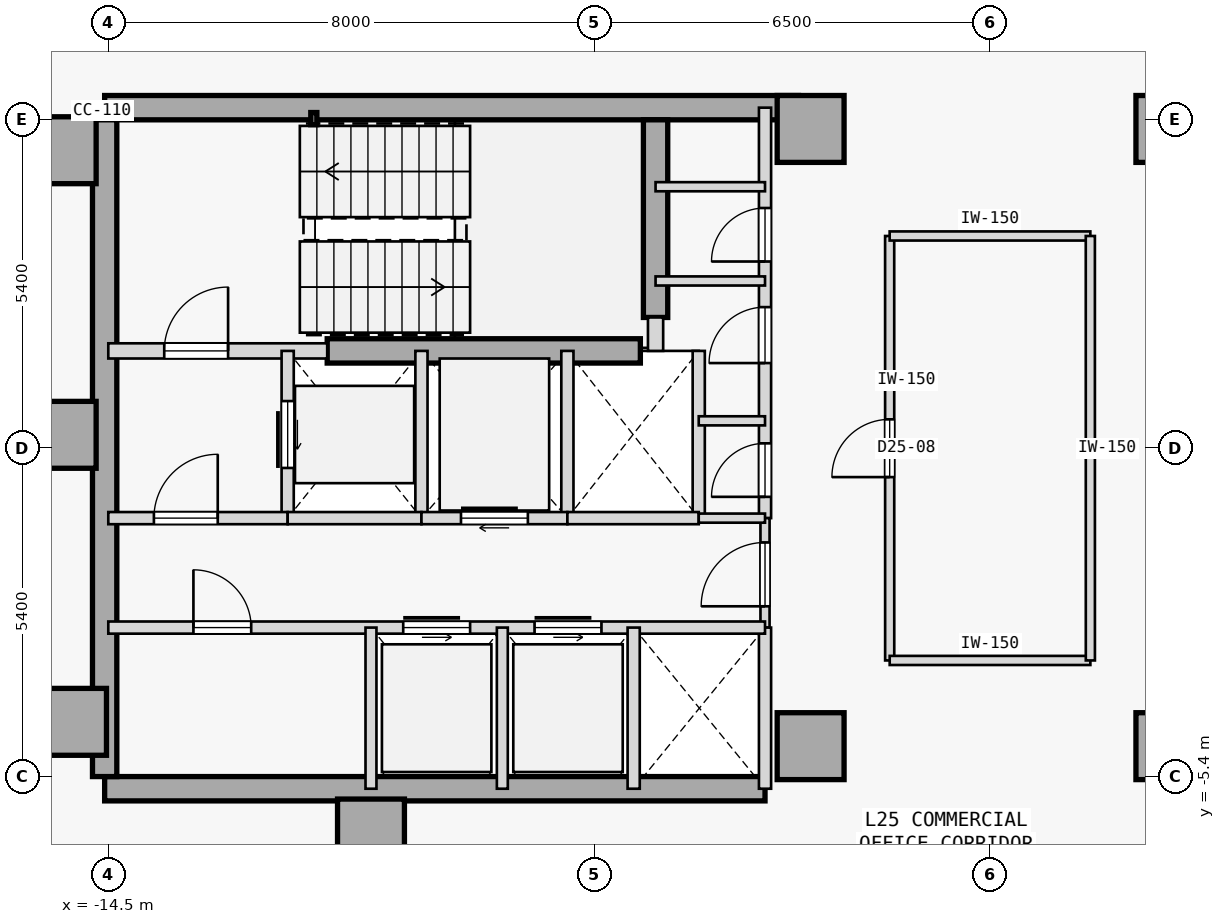
"""IFC4 building model, lengths in metres.
Left out: names, types, materials, properties, quantities, classifications, styles, units other than length and angle.
Written with IfcOpenShell. Run it as: python <this file> out.ifc"""

import sys

from ifc_helpers import new_model, si_unit, direction, frame, frame_2d, origin, origin_2d, place, context, subcontext, project, spatial, rectangle, hollow_rectangle, extrude, element, fill, save


model = new_model("IFC4")
c1 = context("Model", 3, precision=1e-05, world=origin(), true_north=direction((0.0, 1.0)))
c2 = subcontext(c1, "Body", "Model", "MODEL_VIEW")
j1 = project(units=[si_unit("LENGTHUNIT", "METRE"), si_unit("PLANEANGLEUNIT", "RADIAN")], contexts=[c1])
p1 = place(None, origin())
s1 = spatial("IfcSite", under=j1, at=p1, CompositionType="ELEMENT")
p2 = place(p1, origin())
s2 = spatial("IfcBuilding", under=s1, at=p2, CompositionType="ELEMENT")
p3 = place(p2, frame((0.0, 0.0, 102.2)))
s3 = spatial("IfcBuildingStorey", under=s2, at=p3, CompositionType="ELEMENT", Elevation=102.2)
for number, where, z_axis, x_axis in (
    (1, (-15.25, 4.9, 0.0), (0.0, 0.0, 1.0), (1.0, 0.0, 0.0)),
    (2, (-15.25, 0.22, 0.0), (0.0, 0.0, 1.0), (1.0, 0.0, 0.0)),
    (3, (-15.08, -4.5, 0.0), (0.0, 0.0, 1.0), (1.0, 0.0, 0.0)),
    (4, (-10.18, -6.32, 0.0), (0.0, 0.0, 1.0), (1.0, 0.0, 0.0)),
    (5, (-2.95, -4.9, 0.0), (0.0, 0.0, 1.0), (1.0, 0.0, 0.0)),
    (6, (-2.95, 5.25, 0.0), (0.0, 0.0, 1.0), (1.0, 0.0, 0.0)),
    (7, (2.95, -4.9, 0.0), (0.0, 0.0, 1.0), (1.0, 0.0, 0.0)),
    (8, (2.95, 5.25, 0.0), (0.0, 0.0, 1.0), (1.0, 0.0, 0.0)),
):
    element("IfcColumn", number, at=place(p3, frame(where, z_axis=z_axis, x_axis=x_axis)), inside=s3, PredefinedType="COLUMN", context=c2, shape_type="SweptSolid", body=[
        extrude(rectangle(XDim=1.1, YDim=1.1, at=origin_2d()), origin(), (0.0, 0.0, 1.0), 3.7),
    ])
p4 = place(p3, frame((-14.56, 5.6, 0.0), z_axis=(0.0, 0.0, 1.0), x_axis=(1.0, 0.0, 0.0)))
e9 = element("IfcWall", 9, at=p4, inside=s3, PredefinedType="SHEAR", context=c2, shape_type="SweptSolid", body=[
    extrude(rectangle(XDim=11.41, YDim=0.4, at=frame_2d((5.705, 0.0))), origin(), (0.0, 0.0, 1.0), 3.475),
])
p5 = place(p3, frame((-14.56, -5.6, 0.0), z_axis=(0.0, 0.0, 1.0), x_axis=(1.0, 0.0, 0.0)))
e10 = element("IfcWall", 10, at=p5, inside=s3, PredefinedType="SHEAR", context=c2, shape_type="SweptSolid", body=[
    extrude(rectangle(XDim=10.86, YDim=0.4, at=frame_2d((5.43, 0.0))), origin(), (0.0, 0.0, 1.0), 3.475),
])
p6 = place(p3, frame((-14.56, -5.4, 0.0), z_axis=(0.0, 0.0, 1.0), x_axis=(0.0, 1.0, 0.0)))
e11 = element("IfcWall", 11, at=p6, inside=s3, PredefinedType="SHEAR", context=c2, shape_type="SweptSolid", body=[
    extrude(rectangle(XDim=10.8, YDim=0.4, at=frame_2d((5.4, 0.0))), origin(), (0.0, 0.0, 1.0), 3.475),
])
p7 = place(p3, frame((-5.5, 2.15, 0.0), z_axis=(0.0, 0.0, 1.0), x_axis=(0.0, 1.0, 0.0)))
e12 = element("IfcWall", 12, at=p7, inside=s3, PredefinedType="SHEAR", context=c2, shape_type="SweptSolid", body=[
    extrude(rectangle(XDim=3.25, YDim=0.4, at=frame_2d((1.625, 0.0))), origin(), (0.0, 0.0, 1.0), 3.475),
])
p8 = place(p3, frame((-10.9, 1.6, 0.0), z_axis=(0.0, 0.0, 1.0), x_axis=(1.0, 0.0, 0.0)))
e13 = element("IfcWall", 13, at=p8, inside=s3, PredefinedType="SHEAR", context=c2, shape_type="SweptSolid", body=[
    extrude(rectangle(XDim=5.15, YDim=0.4, at=frame_2d((2.575, 0.0))), origin(), (0.0, 0.0, 1.0), 3.475),
])
p9 = place(p3, frame((-11.12, 5.42, 0.0), z_axis=(0.0, 0.0, 1.0), x_axis=(1.0, 0.0, 0.0)))
e14 = element("IfcColumn", 14, at=p9, inside=s3, PredefinedType="COLUMN", context=c2, shape_type="SweptSolid", body=[
    extrude(hollow_rectangle(XDim=0.1, YDim=0.2, WallThickness=0.008, at=origin_2d()), origin(), (0.0, 0.0, 1.0), 3.7),
])
p10 = place(p3, frame((-14.5, 1.6, 0.0), z_axis=(0.0, 0.0, 1.0), x_axis=(1.0, 0.0, 0.0)))
e15 = element("IfcWall", 15, at=p10, inside=s3, PredefinedType="STANDARD", context=c2, shape_type="SweptSolid", body=[
    extrude(rectangle(XDim=3.6, YDim=0.25, at=frame_2d((1.8, 0.0))), origin(), (0.0, 0.0, 1.0), 3.475),
])
p11 = place(p10, frame((0.92, 0.0, 0.0)))
e16 = element("IfcOpeningElement", 16, at=p11, cuts=e15, PredefinedType="OPENING", context=c2, shape_type="SweptSolid", body=[
    extrude(rectangle(XDim=1.05, YDim=2.15, at=frame_2d((0.525, 1.075))), frame((0.0, 0.135, 0.0), z_axis=(0.0, -1.0, 0.0), x_axis=(1.0, 0.0, 0.0)), (0.0, 0.0, 1.0), 0.27),
])
p12 = place(p3, frame((-5.5, 1.6, 0.0), z_axis=(0.0, 0.0, 1.0), x_axis=(0.0, 1.0, 0.0)))
e17 = element("IfcWall", 17, at=p12, inside=s3, PredefinedType="STANDARD", context=c2, shape_type="SweptSolid", body=[
    extrude(rectangle(XDim=0.55, YDim=0.25, at=frame_2d((0.275, 0.0))), origin(), (0.0, 0.0, 1.0), 3.475),
])
p13 = place(p3, frame((-3.7, -1.15, 0.0), z_axis=(0.0, 0.0, 1.0), x_axis=(0.0, 1.0, 0.0)))
e18 = element("IfcWall", 18, at=p13, inside=s3, PredefinedType="STANDARD", context=c2, shape_type="SweptSolid", body=[
    extrude(rectangle(XDim=6.75, YDim=0.2, at=frame_2d((3.375, 0.0))), origin(), (0.0, 0.0, 1.0), 3.475),
])
p14 = place(p13, frame((0.35, 0.0, 0.0)))
e19 = element("IfcOpeningElement", 19, at=p14, cuts=e18, PredefinedType="OPENING", context=c2, shape_type="SweptSolid", body=[
    extrude(rectangle(XDim=0.88, YDim=2.15, at=frame_2d((0.44, 1.075))), frame((0.0, 0.11, 0.0), z_axis=(0.0, -1.0, 0.0), x_axis=(1.0, 0.0, 0.0)), (0.0, 0.0, 1.0), 0.22),
])
p15 = place(p13, frame((2.55, 0.0, 0.0)))
e20 = element("IfcOpeningElement", 20, at=p15, cuts=e18, PredefinedType="OPENING", context=c2, shape_type="SweptSolid", body=[
    extrude(rectangle(XDim=0.92, YDim=2.15, at=frame_2d((0.46, 1.075))), frame((0.0, 0.11, 0.0), z_axis=(0.0, -1.0, 0.0), x_axis=(1.0, 0.0, 0.0)), (0.0, 0.0, 1.0), 0.22),
])
p16 = place(p13, frame((4.22, 0.0, 0.0)))
e21 = element("IfcOpeningElement", 21, at=p16, cuts=e18, PredefinedType="OPENING", context=c2, shape_type="SweptSolid", body=[
    extrude(rectangle(XDim=0.88, YDim=2.15, at=frame_2d((0.44, 1.075))), frame((0.0, 0.11, 0.0), z_axis=(0.0, -1.0, 0.0), x_axis=(1.0, 0.0, 0.0)), (0.0, 0.0, 1.0), 0.22),
])
p17 = place(p3, frame((-3.7, -2.95, 0.0), z_axis=(0.0, 0.0, 1.0), x_axis=(0.0, 1.0, 0.0)))
e22 = element("IfcWall", 22, at=p17, inside=s3, PredefinedType="PARTITIONING", context=c2, shape_type="SweptSolid", body=[
    extrude(rectangle(XDim=1.8, YDim=0.15, at=frame_2d((0.9, 0.0))), origin(), (0.0, 0.0, 1.0), 3.475),
])
p18 = place(p17, frame((0.35, 0.0, 0.0)))
e23 = element("IfcOpeningElement", 23, at=p18, cuts=e22, PredefinedType="OPENING", context=c2, shape_type="SweptSolid", body=[
    extrude(rectangle(XDim=1.05, YDim=2.18, at=frame_2d((0.525, 1.09))), frame((0.0, 0.085, 0.0), z_axis=(0.0, -1.0, 0.0), x_axis=(1.0, 0.0, 0.0)), (0.0, 0.0, 1.0), 0.17),
])
p19 = place(p3, frame((-3.7, -5.6, 0.0), z_axis=(0.0, 0.0, 1.0), x_axis=(0.0, 1.0, 0.0)))
e24 = element("IfcWall", 24, at=p19, inside=s3, PredefinedType="STANDARD", context=c2, shape_type="SweptSolid", body=[
    extrude(rectangle(XDim=2.65, YDim=0.2, at=frame_2d((1.325, 0.0))), origin(), (0.0, 0.0, 1.0), 3.475),
])
p20 = place(p3, frame((-11.55, -1.15, 0.0), z_axis=(0.0, 0.0, 1.0), x_axis=(0.0, 1.0, 0.0)))
e25 = element("IfcWall", 25, at=p20, inside=s3, PredefinedType="STANDARD", context=c2, shape_type="SweptSolid", body=[
    extrude(rectangle(XDim=2.75, YDim=0.2, at=frame_2d((1.375, 0.0))), origin(), (0.0, 0.0, 1.0), 3.475),
])
p21 = place(p20, frame((0.825, 0.0, 0.0)))
e26 = element("IfcOpeningElement", 26, at=p21, cuts=e25, PredefinedType="OPENING", context=c2, shape_type="SweptSolid", body=[
    extrude(rectangle(XDim=1.1, YDim=2.15, at=frame_2d((0.55, 1.075))), frame((0.0, 0.11, 0.0), z_axis=(0.0, -1.0, 0.0), x_axis=(1.0, 0.0, 0.0)), (0.0, 0.0, 1.0), 0.22),
])
p22 = place(p3, frame((-9.35, -1.15, 0.0), z_axis=(0.0, 0.0, 1.0), x_axis=(0.0, 1.0, 0.0)))
e27 = element("IfcWall", 27, at=p22, inside=s3, PredefinedType="STANDARD", context=c2, shape_type="SweptSolid", body=[
    extrude(rectangle(XDim=2.75, YDim=0.2, at=frame_2d((1.375, 0.0))), origin(), (0.0, 0.0, 1.0), 3.475),
])
p23 = place(p3, frame((-14.5, -1.15, 0.0), z_axis=(0.0, 0.0, 1.0), x_axis=(1.0, 0.0, 0.0)))
e28 = element("IfcWall", 28, at=p23, inside=s3, PredefinedType="STANDARD", context=c2, shape_type="SweptSolid", body=[
    extrude(rectangle(XDim=2.95, YDim=0.2, at=frame_2d((1.475, 0.0))), origin(), (0.0, 0.0, 1.0), 3.475),
])
p24 = place(p23, frame((0.75, 0.0, 0.0)))
e29 = element("IfcOpeningElement", 29, at=p24, cuts=e28, PredefinedType="OPENING", context=c2, shape_type="SweptSolid", body=[
    extrude(rectangle(XDim=1.05, YDim=2.18, at=frame_2d((0.525, 1.09))), frame((0.0, 0.11, 0.0), z_axis=(0.0, -1.0, 0.0), x_axis=(1.0, 0.0, 0.0)), (0.0, 0.0, 1.0), 0.22),
])
p25 = place(p3, frame((-11.55, -1.15, 0.0), z_axis=(0.0, 0.0, 1.0), x_axis=(1.0, 0.0, 0.0)))
e30 = element("IfcWall", 30, at=p25, inside=s3, PredefinedType="STANDARD", context=c2, shape_type="SweptSolid", body=[
    extrude(rectangle(XDim=2.2, YDim=0.2, at=frame_2d((1.1, 0.0))), origin(), (0.0, 0.0, 1.0), 3.475),
])
p26 = place(p3, frame((-6.95, -1.15, 0.0), z_axis=(0.0, 0.0, 1.0), x_axis=(0.0, 1.0, 0.0)))
e31 = element("IfcWall", 31, at=p26, inside=s3, PredefinedType="STANDARD", context=c2, shape_type="SweptSolid", body=[
    extrude(rectangle(XDim=2.75, YDim=0.2, at=frame_2d((1.375, 0.0))), origin(), (0.0, 0.0, 1.0), 3.475),
])
p27 = place(p3, frame((-9.35, -1.15, 0.0), z_axis=(0.0, 0.0, 1.0), x_axis=(1.0, 0.0, 0.0)))
e32 = element("IfcWall", 32, at=p27, inside=s3, PredefinedType="STANDARD", context=c2, shape_type="SweptSolid", body=[
    extrude(rectangle(XDim=2.4, YDim=0.2, at=frame_2d((1.2, 0.0))), origin(), (0.0, 0.0, 1.0), 3.475),
])
p28 = place(p27, frame((0.65, 0.0, 0.0)))
e33 = element("IfcOpeningElement", 33, at=p28, cuts=e32, PredefinedType="OPENING", context=c2, shape_type="SweptSolid", body=[
    extrude(rectangle(XDim=1.1, YDim=2.15, at=frame_2d((0.55, 1.075))), frame((0.0, 0.11, 0.0), z_axis=(0.0, -1.0, 0.0), x_axis=(1.0, 0.0, 0.0)), (0.0, 0.0, 1.0), 0.22),
])
p29 = place(p3, frame((-4.79, -1.15, 0.0), z_axis=(0.0, 0.0, 1.0), x_axis=(0.0, 1.0, 0.0)))
e34 = element("IfcWall", 34, at=p29, inside=s3, PredefinedType="STANDARD", context=c2, shape_type="SweptSolid", body=[
    extrude(rectangle(XDim=2.75, YDim=0.2, at=frame_2d((1.375, 0.0))), origin(), (0.0, 0.0, 1.0), 3.475),
])
p30 = place(p3, frame((-6.95, -1.15, 0.0), z_axis=(0.0, 0.0, 1.0), x_axis=(1.0, 0.0, 0.0)))
e35 = element("IfcWall", 35, at=p30, inside=s3, PredefinedType="STANDARD", context=c2, shape_type="SweptSolid", body=[
    extrude(rectangle(XDim=2.16, YDim=0.2, at=frame_2d((1.08, 0.0))), origin(), (0.0, 0.0, 1.0), 3.475),
])
p31 = place(p3, frame((-4.79, -1.15, 0.0), z_axis=(0.0, 0.0, 1.0), x_axis=(1.0, 0.0, 0.0)))
e36 = element("IfcWall", 36, at=p31, inside=s3, PredefinedType="PARTITIONING", context=c2, shape_type="SweptSolid", body=[
    extrude(rectangle(XDim=1.09, YDim=0.15, at=frame_2d((0.545, 0.0))), origin(), (0.0, 0.0, 1.0), 3.475),
])
p32 = place(p3, frame((-14.5, -2.95, 0.0), z_axis=(0.0, 0.0, 1.0), x_axis=(1.0, 0.0, 0.0)))
e37 = element("IfcWall", 37, at=p32, inside=s3, PredefinedType="STANDARD", context=c2, shape_type="SweptSolid", body=[
    extrude(rectangle(XDim=10.8, YDim=0.2, at=frame_2d((5.4, 0.0))), origin(), (0.0, 0.0, 1.0), 3.475),
])
p33 = place(p32, frame((4.85, 0.0, 0.0)))
e38 = element("IfcOpeningElement", 38, at=p33, cuts=e37, PredefinedType="OPENING", context=c2, shape_type="SweptSolid", body=[
    extrude(rectangle(XDim=1.1, YDim=2.15, at=frame_2d((0.55, 1.075))), frame((0.0, 0.11, 0.0), z_axis=(0.0, -1.0, 0.0), x_axis=(1.0, 0.0, 0.0)), (0.0, 0.0, 1.0), 0.22),
])
p34 = place(p32, frame((7.01, 0.0, 0.0)))
e39 = element("IfcOpeningElement", 39, at=p34, cuts=e37, PredefinedType="OPENING", context=c2, shape_type="SweptSolid", body=[
    extrude(rectangle(XDim=1.1, YDim=2.15, at=frame_2d((0.55, 1.075))), frame((0.0, 0.11, 0.0), z_axis=(0.0, -1.0, 0.0), x_axis=(1.0, 0.0, 0.0)), (0.0, 0.0, 1.0), 0.22),
])
p35 = place(p32, frame((1.4, 0.0, 0.0)))
e40 = element("IfcOpeningElement", 40, at=p35, cuts=e37, PredefinedType="OPENING", context=c2, shape_type="SweptSolid", body=[
    extrude(rectangle(XDim=0.95, YDim=2.15, at=frame_2d((0.475, 1.075))), frame((0.0, 0.11, 0.0), z_axis=(0.0, -1.0, 0.0), x_axis=(1.0, 0.0, 0.0)), (0.0, 0.0, 1.0), 0.22),
])
p36 = place(p3, frame((-5.86, -5.6, 0.0), z_axis=(0.0, 0.0, 1.0), x_axis=(0.0, 1.0, 0.0)))
e41 = element("IfcWall", 41, at=p36, inside=s3, PredefinedType="STANDARD", context=c2, shape_type="SweptSolid", body=[
    extrude(rectangle(XDim=2.65, YDim=0.2, at=frame_2d((1.325, 0.0))), origin(), (0.0, 0.0, 1.0), 3.475),
])
for number, where, z_axis, x_axis in (
    (42, (-10.18, -5.6, 0.0), (0.0, 0.0, 1.0), (0.0, 1.0, 0.0)),
    (43, (-8.02, -5.6, 0.0), (0.0, 0.0, 1.0), (0.0, 1.0, 0.0)),
):
    element("IfcWall", number, at=place(p3, frame(where, z_axis=z_axis, x_axis=x_axis)), inside=s3, PredefinedType="STANDARD", context=c2, shape_type="SweptSolid", body=[
        extrude(rectangle(XDim=2.65, YDim=0.18, at=frame_2d((1.325, 0.0))), origin(), (0.0, 0.0, 1.0), 3.475),
    ])
p37 = place(p3, frame((-5.5, 4.3, 0.0), z_axis=(0.0, 0.0, 1.0), x_axis=(1.0, 0.0, 0.0)))
e44 = element("IfcWall", 44, at=p37, inside=s3, PredefinedType="PARTITIONING", context=c2, shape_type="SweptSolid", body=[
    extrude(rectangle(XDim=1.8, YDim=0.15, at=frame_2d((0.9, 0.0))), origin(), (0.0, 0.0, 1.0), 3.475),
])
p38 = place(p3, frame((-4.79, 0.45, 0.0), z_axis=(0.0, 0.0, 1.0), x_axis=(1.0, 0.0, 0.0)))
e45 = element("IfcWall", 45, at=p38, inside=s3, PredefinedType="PARTITIONING", context=c2, shape_type="SweptSolid", body=[
    extrude(rectangle(XDim=1.09, YDim=0.15, at=frame_2d((0.545, 0.0))), origin(), (0.0, 0.0, 1.0), 3.475),
])
p39 = place(p3, frame((-5.5, 2.75, 0.0), z_axis=(0.0, 0.0, 1.0), x_axis=(1.0, 0.0, 0.0)))
e46 = element("IfcWall", 46, at=p39, inside=s3, PredefinedType="PARTITIONING", context=c2, shape_type="SweptSolid", body=[
    extrude(rectangle(XDim=1.8, YDim=0.15, at=frame_2d((0.9, 0.0))), origin(), (0.0, 0.0, 1.0), 3.475),
])
p40 = place(p3, frame((-1.65, -3.49, 0.0), z_axis=(0.0, 0.0, 1.0), x_axis=(-0.000104928124, 0.999999994495, 0.0)))
e47 = element("IfcWall", 47, at=p40, inside=s3, PredefinedType="PARTITIONING", context=c2, shape_type="SweptSolid", body=[
    extrude(rectangle(XDim=6.98, YDim=0.15, at=frame_2d((3.49, 0.0))), origin(), (0.0, 0.0, 1.0), 3.475),
])
p41 = place(p40, frame((3.015, 0.0, 0.0)))
e48 = element("IfcOpeningElement", 48, at=p41, cuts=e47, PredefinedType="OPENING", context=c2, shape_type="SweptSolid", body=[
    extrude(rectangle(XDim=0.95, YDim=2.15, at=frame_2d((0.475, 1.075))), frame((0.0, 0.085, 0.0), z_axis=(0.0, -1.0, 0.0), x_axis=(1.0, 0.0, 0.0)), (0.0, 0.0, 1.0), 0.17),
])
p42 = place(p3, frame((-1.65, -3.49, 0.0), z_axis=(0.0, 0.0, 1.0), x_axis=(1.0, 0.0, 0.0)))
e49 = element("IfcWall", 49, at=p42, inside=s3, PredefinedType="PARTITIONING", context=c2, shape_type="SweptSolid", body=[
    extrude(rectangle(XDim=3.3, YDim=0.15, at=frame_2d((1.65, 0.0))), origin(), (0.0, 0.0, 1.0), 3.475),
])
p43 = place(p3, frame((-1.65, 3.49, 0.0), z_axis=(0.0, 0.0, 1.0), x_axis=(1.0, 0.0, 0.0)))
e50 = element("IfcWall", 50, at=p43, inside=s3, PredefinedType="PARTITIONING", context=c2, shape_type="SweptSolid", body=[
    extrude(rectangle(XDim=3.3, YDim=0.15, at=frame_2d((1.65, 0.0))), origin(), (0.0, 0.0, 1.0), 3.475),
])
p44 = place(p3, frame((1.65, -3.49, 0.0), z_axis=(0.0, 0.0, 1.0), x_axis=(-6.9952083e-05, 0.999999997553, 0.0)))
e51 = element("IfcWall", 51, at=p44, inside=s3, PredefinedType="PARTITIONING", context=c2, shape_type="SweptSolid", body=[
    extrude(rectangle(XDim=6.98, YDim=0.15, at=frame_2d((3.49, 0.0))), origin(), (0.0, 0.0, 1.0), 3.475),
])
p45 = place(p11, origin())
e52 = element("IfcDoor", 52, at=p45, inside=s3, OperationType="SINGLE_SWING_RIGHT", PredefinedType="DOOR", context=c2, shape_type="SweptSolid", body=[
    extrude(rectangle(XDim=1.05, YDim=2.15, at=frame_2d((0.525, 1.075))), frame((0.0, 0.025, 0.0), z_axis=(0.0, -1.0, 0.0), x_axis=(1.0, 0.0, 0.0)), (0.0, 0.0, 1.0), 0.05),
])
fill(e16, e52)
p46 = place(p24, origin())
e53 = element("IfcDoor", 53, at=p46, inside=s3, OperationType="SINGLE_SWING_RIGHT", PredefinedType="DOOR", context=c2, shape_type="SweptSolid", body=[
    extrude(rectangle(XDim=1.05, YDim=2.18, at=frame_2d((0.525, 1.09))), frame((0.0, 0.025, 0.0), z_axis=(0.0, -1.0, 0.0), x_axis=(1.0, 0.0, 0.0)), (0.0, 0.0, 1.0), 0.05),
])
fill(e29, e53)
p47 = place(p18, origin())
e54 = element("IfcDoor", 54, at=p47, inside=s3, OperationType="SINGLE_SWING_LEFT", PredefinedType="DOOR", context=c2, shape_type="SweptSolid", body=[
    extrude(rectangle(XDim=1.05, YDim=2.18, at=frame_2d((0.525, 1.09))), frame((0.0, 0.025, 0.0), z_axis=(0.0, -1.0, 0.0), x_axis=(1.0, 0.0, 0.0)), (0.0, 0.0, 1.0), 0.05),
])
fill(e23, e54)
p48 = place(p21, origin())
e55 = element("IfcDoor", 55, at=p48, inside=s3, OperationType="SLIDING_TO_RIGHT", PredefinedType="DOOR", context=c2, shape_type="SweptSolid", body=[
    extrude(rectangle(XDim=1.1, YDim=2.15, at=frame_2d((0.55, 1.075))), frame((0.0, 0.025, 0.0), z_axis=(0.0, -1.0, 0.0), x_axis=(1.0, 0.0, 0.0)), (0.0, 0.0, 1.0), 0.05),
])
fill(e26, e55)
p49 = place(p28, origin())
e56 = element("IfcDoor", 56, at=p49, inside=s3, OperationType="SLIDING_TO_RIGHT", PredefinedType="DOOR", context=c2, shape_type="SweptSolid", body=[
    extrude(rectangle(XDim=1.1, YDim=2.15, at=frame_2d((0.55, 1.075))), frame((0.0, 0.025, 0.0), z_axis=(0.0, -1.0, 0.0), x_axis=(1.0, 0.0, 0.0)), (0.0, 0.0, 1.0), 0.05),
])
fill(e33, e56)
p50 = place(p33, origin())
e57 = element("IfcDoor", 57, at=p50, inside=s3, OperationType="SLIDING_TO_LEFT", PredefinedType="DOOR", context=c2, shape_type="SweptSolid", body=[
    extrude(rectangle(XDim=1.1, YDim=2.15, at=frame_2d((0.55, 1.075))), frame((0.0, 0.025, 0.0), z_axis=(0.0, -1.0, 0.0), x_axis=(1.0, 0.0, 0.0)), (0.0, 0.0, 1.0), 0.05),
])
fill(e38, e57)
p51 = place(p34, origin())
e58 = element("IfcDoor", 58, at=p51, inside=s3, OperationType="SLIDING_TO_LEFT", PredefinedType="DOOR", context=c2, shape_type="SweptSolid", body=[
    extrude(rectangle(XDim=1.1, YDim=2.15, at=frame_2d((0.55, 1.075))), frame((0.0, 0.025, 0.0), z_axis=(0.0, -1.0, 0.0), x_axis=(1.0, 0.0, 0.0)), (0.0, 0.0, 1.0), 0.05),
])
fill(e39, e58)
p52 = place(p35, origin())
e59 = element("IfcDoor", 59, at=p52, inside=s3, OperationType="SINGLE_SWING_LEFT", PredefinedType="DOOR", context=c2, shape_type="SweptSolid", body=[
    extrude(rectangle(XDim=0.95, YDim=2.15, at=frame_2d((0.475, 1.075))), frame((0.0, 0.025, 0.0), z_axis=(0.0, -1.0, 0.0), x_axis=(1.0, 0.0, 0.0)), (0.0, 0.0, 1.0), 0.05),
])
fill(e40, e59)
p53 = place(p14, origin())
e60 = element("IfcDoor", 60, at=p53, inside=s3, OperationType="SINGLE_SWING_LEFT", PredefinedType="DOOR", context=c2, shape_type="SweptSolid", body=[
    extrude(rectangle(XDim=0.88, YDim=2.15, at=frame_2d((0.44, 1.075))), frame((0.0, 0.025, 0.0), z_axis=(0.0, -1.0, 0.0), x_axis=(1.0, 0.0, 0.0)), (0.0, 0.0, 1.0), 0.05),
])
fill(e19, e60)
p54 = place(p15, origin())
e61 = element("IfcDoor", 61, at=p54, inside=s3, OperationType="SINGLE_SWING_LEFT", PredefinedType="DOOR", context=c2, shape_type="SweptSolid", body=[
    extrude(rectangle(XDim=0.92, YDim=2.15, at=frame_2d((0.46, 1.075))), frame((0.0, 0.025, 0.0), z_axis=(0.0, -1.0, 0.0), x_axis=(1.0, 0.0, 0.0)), (0.0, 0.0, 1.0), 0.05),
])
fill(e20, e61)
p55 = place(p16, origin())
e62 = element("IfcDoor", 62, at=p55, inside=s3, OperationType="SINGLE_SWING_LEFT", PredefinedType="DOOR", context=c2, shape_type="SweptSolid", body=[
    extrude(rectangle(XDim=0.88, YDim=2.15, at=frame_2d((0.44, 1.075))), frame((0.0, 0.025, 0.0), z_axis=(0.0, -1.0, 0.0), x_axis=(1.0, 0.0, 0.0)), (0.0, 0.0, 1.0), 0.05),
])
fill(e21, e62)
p56 = place(p41, origin())
e63 = element("IfcDoor", 63, at=p56, inside=s3, OperationType="SINGLE_SWING_LEFT", PredefinedType="DOOR", context=c2, shape_type="SweptSolid", body=[
    extrude(rectangle(XDim=0.95, YDim=2.15, at=frame_2d((0.475, 1.075))), frame((0.0, 0.025, 0.0), z_axis=(0.0, -1.0, 0.0), x_axis=(1.0, 0.0, 0.0)), (0.0, 0.0, 1.0), 0.05),
])
fill(e48, e63)
save(model, sys.argv[1])
